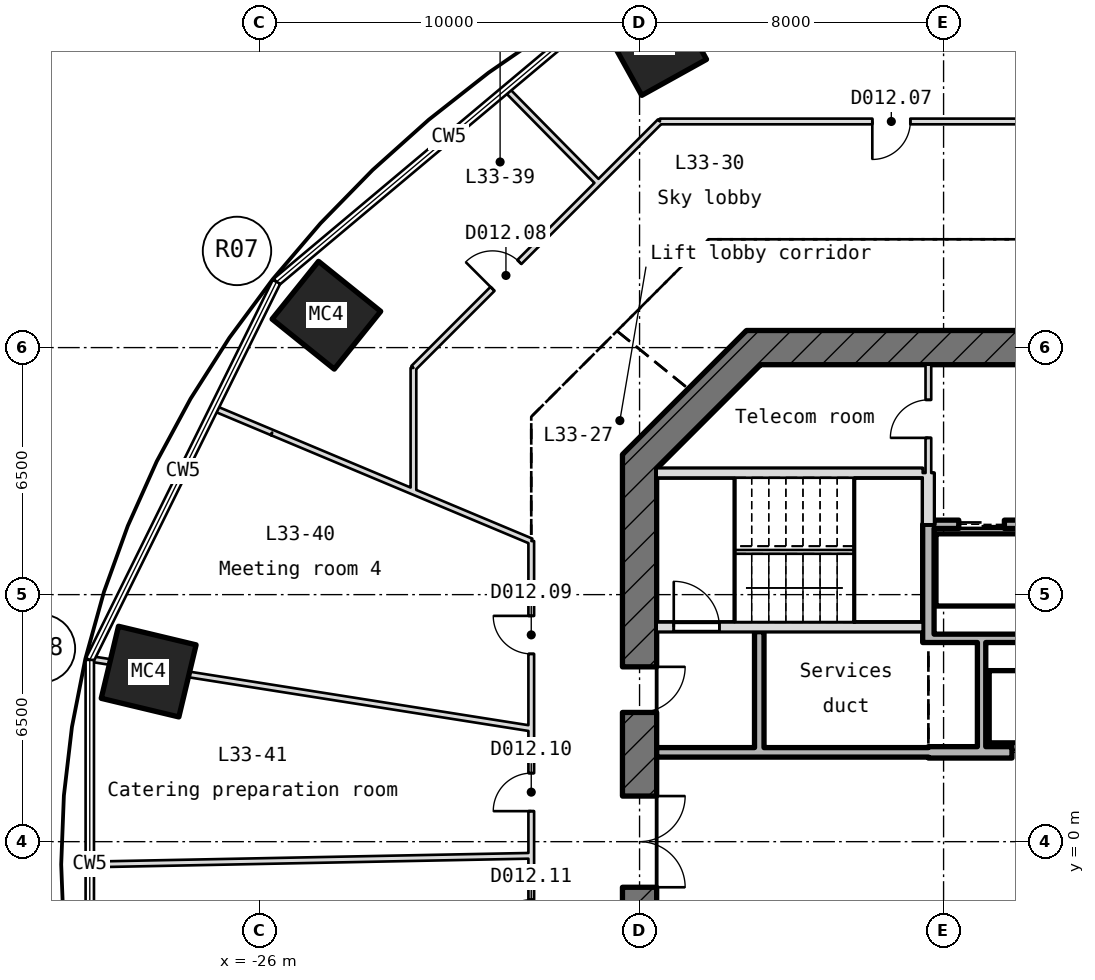
"""IFC4 building model, lengths in metres.
Left out: names, types, materials, properties, quantities, classifications, styles, units other than length and angle.
Written with IfcOpenShell. Run it as: python <this file> out.ifc"""

import sys

from ifc_helpers import new_model, si_unit, direction, frame, frame_2d, origin, origin_2d, place, context, subcontext, project, spatial, rectangle, hollow_rectangle, extrude, element, fill, save


model = new_model("IFC4")
c1 = context("Model", 3, precision=1e-05, world=origin(), true_north=direction((0.0, 1.0)))
c2 = subcontext(c1, "Body", "Model", "MODEL_VIEW")
j1 = project(units=[si_unit("LENGTHUNIT", "METRE"), si_unit("PLANEANGLEUNIT", "RADIAN")], contexts=[c1])
p1 = place(None, origin())
s1 = spatial("IfcSite", under=j1, at=p1, CompositionType="ELEMENT")
p2 = place(p1, origin())
s2 = spatial("IfcBuilding", under=s1, at=p2, CompositionType="ELEMENT")
p3 = place(p2, frame((0.0, 0.0, 155.65)))
s3 = spatial("IfcBuildingStorey", under=s2, at=p3, CompositionType="ELEMENT", Elevation=155.65)
for number, where, z_axis, x_axis in (
    (1, (-15.6, 21.028, -0.25), (0.0, 0.0, 1.0), (0.874, 0.485, 0.0)),
    (2, (-24.241, 13.852, -0.25), (0.0, 0.0, 1.0), (0.627, 0.779, 0.0)),
    (3, (-28.917, 4.475, -0.25), (0.0, 0.0, 1.0), (0.233, 0.972, 0.0)),
):
    element("IfcColumn", number, at=place(p3, frame(where, z_axis=z_axis, x_axis=x_axis)), inside=s3, PredefinedType="COLUMN", context=c2, shape_type="SweptSolid", body=[
        extrude(hollow_rectangle(XDim=1.95, YDim=2.1, WallThickness=0.075, at=origin_2d()), origin(), (0.0, 0.0, 1.0), 5.47),
    ])
p4 = place(p3, frame((13.186, 13.0, -0.25), z_axis=(0.0, 0.0, 1.0), x_axis=(-1.0, 0.0, 0.0)))
e4 = element("IfcWall", 4, at=p4, inside=s3, PredefinedType="SHEAR", context=c2, shape_type="SweptSolid", body=[
    extrude(rectangle(XDim=26.373, YDim=0.9, at=frame_2d((13.186, 0.0))), origin(), (0.0, 0.0, 1.0), 5.47),
])
p5 = place(p4, frame((11.986, 0.0, 0.25)))
e5 = element("IfcOpeningElement", 5, at=p5, cuts=e4, PredefinedType="OPENING", context=c2, shape_type="SweptSolid", body=[
    extrude(rectangle(XDim=2.4, YDim=2.1, at=frame_2d((1.2, 1.05))), frame((0.0, 0.46, 0.0), z_axis=(0.0, -1.0, 0.0), x_axis=(1.0, 0.0, 0.0)), (0.0, 0.0, 1.0), 0.92),
])
p6 = place(p3, frame((-12.868, 13.132, -0.25), z_axis=(0.0, 0.0, 1.0), x_axis=(-0.707106781187, -0.707106781187, 0.0)))
e6 = element("IfcWall", 6, at=p6, inside=s3, PredefinedType="SHEAR", context=c2, shape_type="SweptSolid", body=[
    extrude(rectangle(XDim=4.615, YDim=0.9, at=frame_2d((2.308, 0.0))), origin(), (0.0, 0.0, 1.0), 5.47),
])
p7 = place(p3, frame((-16.0, 10.186, -0.25), z_axis=(0.0, 0.0, 1.0), x_axis=(0.0, -1.0, 0.0)))
e7 = element("IfcWall", 7, at=p7, inside=s3, PredefinedType="SHEAR", context=c2, shape_type="SweptSolid", body=[
    extrude(rectangle(XDim=20.373, YDim=0.9, at=frame_2d((10.186, 0.0))), origin(), (0.0, 0.0, 1.0), 5.47),
])
p8 = place(p7, frame((8.986, 0.0, 0.25)))
e8 = element("IfcOpeningElement", 8, at=p8, cuts=e7, PredefinedType="OPENING", context=c2, shape_type="SweptSolid", body=[
    extrude(rectangle(XDim=2.4, YDim=2.1, at=frame_2d((1.2, 1.05))), frame((0.0, 0.46, 0.0), z_axis=(0.0, -1.0, 0.0), x_axis=(1.0, 0.0, 0.0)), (0.0, 0.0, 1.0), 0.92),
])
p9 = place(p7, frame((5.586, 0.0, 0.25)))
e9 = element("IfcOpeningElement", 9, at=p9, cuts=e7, PredefinedType="OPENING", context=c2, shape_type="SweptSolid", body=[
    extrude(rectangle(XDim=1.2, YDim=2.1, at=frame_2d((0.6, 1.05))), frame((0.0, 0.46, 0.0), z_axis=(0.0, -1.0, 0.0), x_axis=(1.0, 0.0, 0.0)), (0.0, 0.0, 1.0), 0.92),
])
p10 = place(p3, frame((-15.55, 2.35, 0.0), z_axis=(0.0, 0.0, 1.0), x_axis=(1.0, 0.0, 0.0)))
e10 = element("IfcWall", 10, at=p10, inside=s3, PredefinedType="STANDARD", context=c2, shape_type="SweptSolid", body=[
    extrude(rectangle(XDim=7.15, YDim=0.25, at=frame_2d((3.575, 0.0))), origin(), (0.0, 0.0, 1.0), 5.22),
])
p11 = place(p3, frame((-8.4, 2.35, -0.25), z_axis=(0.0, 0.0, 1.0), x_axis=(1.0, 0.0, 0.0)))
e11 = element("IfcWall", 11, at=p11, inside=s3, PredefinedType="SHEAR", context=c2, shape_type="SweptSolid", body=[
    extrude(rectangle(XDim=16.8, YDim=0.3, at=frame_2d((8.4, 0.0))), origin(), (0.0, 0.0, 1.0), 5.47),
])
p12 = place(p11, frame((2.2, 0.0, 0.25)))
e12 = element("IfcOpeningElement", 12, at=p12, cuts=e11, PredefinedType="OPENING", context=c2, shape_type="SweptSolid", body=[
    extrude(rectangle(XDim=1.2, YDim=2.1, at=frame_2d((0.6, 1.05))), frame((0.0, 0.16, 0.0), z_axis=(0.0, -1.0, 0.0), x_axis=(1.0, 0.0, 0.0)), (0.0, 0.0, 1.0), 0.32),
])
p13 = place(p11, frame((5.0, 0.0, 0.25)))
e13 = element("IfcOpeningElement", 13, at=p13, cuts=e11, PredefinedType="OPENING", context=c2, shape_type="SweptSolid", body=[
    extrude(rectangle(XDim=1.2, YDim=2.1, at=frame_2d((0.6, 1.05))), frame((0.0, 0.16, 0.0), z_axis=(0.0, -1.0, 0.0), x_axis=(1.0, 0.0, 0.0)), (0.0, 0.0, 1.0), 0.32),
])
p14 = place(p11, frame((7.8, 0.0, 0.25)))
e14 = element("IfcOpeningElement", 14, at=p14, cuts=e11, PredefinedType="OPENING", context=c2, shape_type="SweptSolid", body=[
    extrude(rectangle(XDim=1.2, YDim=2.1, at=frame_2d((0.6, 1.05))), frame((0.0, 0.16, 0.0), z_axis=(0.0, -1.0, 0.0), x_axis=(1.0, 0.0, 0.0)), (0.0, 0.0, 1.0), 0.32),
])
p15 = place(p11, frame((10.6, 0.0, 0.25)))
e15 = element("IfcOpeningElement", 15, at=p15, cuts=e11, PredefinedType="OPENING", context=c2, shape_type="SweptSolid", body=[
    extrude(rectangle(XDim=1.2, YDim=2.1, at=frame_2d((0.6, 1.05))), frame((0.0, 0.16, 0.0), z_axis=(0.0, -1.0, 0.0), x_axis=(1.0, 0.0, 0.0)), (0.0, 0.0, 1.0), 0.32),
])
p16 = place(p11, frame((13.4, 0.0, 0.25)))
e16 = element("IfcOpeningElement", 16, at=p16, cuts=e11, PredefinedType="OPENING", context=c2, shape_type="SweptSolid", body=[
    extrude(rectangle(XDim=1.2, YDim=2.1, at=frame_2d((0.6, 1.05))), frame((0.0, 0.16, 0.0), z_axis=(0.0, -1.0, 0.0), x_axis=(1.0, 0.0, 0.0)), (0.0, 0.0, 1.0), 0.32),
])
p17 = place(p3, frame((-8.25, 5.35, 0.0), z_axis=(0.0, 0.0, 1.0), x_axis=(1.0, 0.0, 0.0)))
e17 = element("IfcWall", 17, at=p17, inside=s3, PredefinedType="STANDARD", context=c2, shape_type="SweptSolid", body=[
    extrude(rectangle(XDim=16.5, YDim=0.22, at=frame_2d((8.25, 0.0))), origin(), (0.0, 0.0, 1.0), 5.22),
])
p18 = place(p3, frame((-15.55, 5.65, -0.25), z_axis=(0.0, 0.0, 1.0), x_axis=(1.0, 0.0, 0.0)))
e18 = element("IfcWall", 18, at=p18, inside=s3, PredefinedType="SHEAR", context=c2, shape_type="SweptSolid", body=[
    extrude(rectangle(XDim=7.0, YDim=0.25, at=frame_2d((3.5, 0.0))), origin(), (0.0, 0.0, 1.0), 5.47),
])
p19 = place(p18, frame((0.45, 0.0, 0.25)))
e19 = element("IfcOpeningElement", 19, at=p19, cuts=e18, PredefinedType="OPENING", context=c2, shape_type="SweptSolid", body=[
    extrude(rectangle(XDim=1.2, YDim=2.1, at=frame_2d((0.6, 1.05))), frame((0.0, 0.135, 0.0), z_axis=(0.0, -1.0, 0.0), x_axis=(1.0, 0.0, 0.0)), (0.0, 0.0, 1.0), 0.27),
])
p20 = place(p3, frame((-8.25, 8.35, 0.0), z_axis=(0.0, 0.0, 1.0), x_axis=(1.0, 0.0, 0.0)))
e20 = element("IfcWall", 20, at=p20, inside=s3, PredefinedType="STANDARD", context=c2, shape_type="SweptSolid", body=[
    extrude(rectangle(XDim=16.5, YDim=0.22, at=frame_2d((8.25, 0.0))), origin(), (0.0, 0.0, 1.0), 5.22),
])
p21 = place(p20, frame((0.65, 0.0, 0.0)))
e21 = element("IfcOpeningElement", 21, at=p21, cuts=e20, PredefinedType="OPENING", context=c2, shape_type="SweptSolid", body=[
    extrude(rectangle(XDim=1.2, YDim=2.1, at=frame_2d((0.6, 1.05))), frame((0.0, 0.12, 0.0), z_axis=(0.0, -1.0, 0.0), x_axis=(1.0, 0.0, 0.0)), (0.0, 0.0, 1.0), 0.24),
])
p22 = place(p20, frame((3.45, 0.0, 0.0)))
e22 = element("IfcOpeningElement", 22, at=p22, cuts=e20, PredefinedType="OPENING", context=c2, shape_type="SweptSolid", body=[
    extrude(rectangle(XDim=1.2, YDim=2.1, at=frame_2d((0.6, 1.05))), frame((0.0, 0.12, 0.0), z_axis=(0.0, -1.0, 0.0), x_axis=(1.0, 0.0, 0.0)), (0.0, 0.0, 1.0), 0.24),
])
p23 = place(p20, frame((6.25, 0.0, 0.0)))
e23 = element("IfcOpeningElement", 23, at=p23, cuts=e20, PredefinedType="OPENING", context=c2, shape_type="SweptSolid", body=[
    extrude(rectangle(XDim=1.2, YDim=2.1, at=frame_2d((0.6, 1.05))), frame((0.0, 0.12, 0.0), z_axis=(0.0, -1.0, 0.0), x_axis=(1.0, 0.0, 0.0)), (0.0, 0.0, 1.0), 0.24),
])
p24 = place(p20, frame((9.05, 0.0, 0.0)))
e24 = element("IfcOpeningElement", 24, at=p24, cuts=e20, PredefinedType="OPENING", context=c2, shape_type="SweptSolid", body=[
    extrude(rectangle(XDim=1.2, YDim=2.1, at=frame_2d((0.6, 1.05))), frame((0.0, 0.12, 0.0), z_axis=(0.0, -1.0, 0.0), x_axis=(1.0, 0.0, 0.0)), (0.0, 0.0, 1.0), 0.24),
])
p25 = place(p3, frame((-15.55, 9.7, -0.25), z_axis=(0.0, 0.0, 1.0), x_axis=(1.0, 0.0, 0.0)))
e25 = element("IfcWall", 25, at=p25, inside=s3, PredefinedType="SHEAR", context=c2, shape_type="SweptSolid", body=[
    extrude(rectangle(XDim=7.0, YDim=0.25, at=frame_2d((3.5, 0.0))), origin(), (0.0, 0.0, 1.0), 5.47),
])
p26 = place(p3, frame((-12.85, 2.475, 0.0), z_axis=(0.0, 0.0, 1.0), x_axis=(0.0, 1.0, 0.0)))
e26 = element("IfcWall", 26, at=p26, inside=s3, PredefinedType="STANDARD", context=c2, shape_type="SweptSolid", body=[
    extrude(rectangle(XDim=3.05, YDim=0.25, at=frame_2d((1.525, 0.0))), origin(), (0.0, 0.0, 1.0), 5.22),
])
p27 = place(p3, frame((-8.4, 5.24, -0.25), z_axis=(0.0, 0.0, 1.0), x_axis=(0.0, 1.0, 0.0)))
e27 = element("IfcWall", 27, at=p27, inside=s3, PredefinedType="SHEAR", context=c2, shape_type="SweptSolid", body=[
    extrude(rectangle(XDim=3.11, YDim=0.3, at=frame_2d((1.555, 0.0))), origin(), (0.0, 0.0, 1.0), 5.47),
])
p28 = place(p3, frame((-8.4, 8.35, -0.25), z_axis=(0.0, 0.0, 1.0), x_axis=(0.0, 1.0, 0.0)))
e28 = element("IfcWall", 28, at=p28, inside=s3, PredefinedType="SHEAR", context=c2, shape_type="SweptSolid", body=[
    extrude(rectangle(XDim=1.35, YDim=0.3, at=frame_2d((0.675, 0.0))), origin(), (0.0, 0.0, 1.0), 5.47),
])
p29 = place(p3, frame((-8.4, 9.7, 0.0), z_axis=(0.0, 0.0, 1.0), x_axis=(0.0, 1.0, 0.0)))
e29 = element("IfcWall", 29, at=p29, inside=s3, PredefinedType="PARTITIONING", context=c2, shape_type="SweptSolid", body=[
    extrude(rectangle(XDim=2.85, YDim=0.15, at=frame_2d((1.425, 0.0))), origin(), (0.0, 0.0, 1.0), 5.22),
])
p30 = place(p29, frame((0.925, 0.0, 0.0)))
e30 = element("IfcOpeningElement", 30, at=p30, cuts=e29, PredefinedType="OPENING", context=c2, shape_type="SweptSolid", body=[
    extrude(rectangle(XDim=1.0, YDim=2.1, at=frame_2d((0.5, 1.05))), frame((0.0, 0.085, 0.0), z_axis=(0.0, -1.0, 0.0), x_axis=(1.0, 0.0, 0.0)), (0.0, 0.0, 1.0), 0.17),
])
p31 = place(p3, frame((-7.0, 2.5, 0.0), z_axis=(0.0, 0.0, 1.0), x_axis=(0.0, 1.0, 0.0)))
e31 = element("IfcWall", 31, at=p31, inside=s3, PredefinedType="STANDARD", context=c2, shape_type="SweptSolid", body=[
    extrude(rectangle(XDim=2.74, YDim=0.22, at=frame_2d((1.37, 0.0))), origin(), (0.0, 0.0, 1.0), 5.22),
])
p32 = place(p3, frame((-15.465, 18.95, 0.0), z_axis=(0.0, 0.0, 1.0), x_axis=(1.0, 0.0, 0.0)))
e32 = element("IfcWall", 32, at=p32, inside=s3, PredefinedType="PARTITIONING", context=c2, shape_type="SweptSolid", body=[
    extrude(rectangle(XDim=30.929, YDim=0.15, at=frame_2d((15.465, 0.0))), origin(), (0.0, 0.0, 1.0), 5.22),
])
p33 = place(p32, frame((24.356, 0.0, 0.0)))
e33 = element("IfcOpeningElement", 33, at=p33, cuts=e32, PredefinedType="OPENING", context=c2, shape_type="SweptSolid", body=[
    extrude(rectangle(XDim=1.0, YDim=2.1, at=frame_2d((0.5, 1.05))), frame((0.0, 0.085, 0.0), z_axis=(0.0, -1.0, 0.0), x_axis=(1.0, 0.0, 0.0)), (0.0, 0.0, 1.0), 0.17),
])
p34 = place(p32, frame((16.276, 0.0, 0.0)))
e34 = element("IfcOpeningElement", 34, at=p34, cuts=e32, PredefinedType="OPENING", context=c2, shape_type="SweptSolid", body=[
    extrude(rectangle(XDim=1.0, YDim=2.1, at=frame_2d((0.5, 1.05))), frame((0.0, 0.085, 0.0), z_axis=(0.0, -1.0, 0.0), x_axis=(1.0, 0.0, 0.0)), (0.0, 0.0, 1.0), 0.17),
])
p35 = place(p32, frame((5.589, 0.0, 0.0)))
e35 = element("IfcOpeningElement", 35, at=p35, cuts=e32, PredefinedType="OPENING", context=c2, shape_type="SweptSolid", body=[
    extrude(rectangle(XDim=1.0, YDim=2.1, at=frame_2d((0.5, 1.05))), frame((0.0, 0.085, 0.0), z_axis=(0.0, -1.0, 0.0), x_axis=(1.0, 0.0, 0.0)), (0.0, 0.0, 1.0), 0.17),
])
p36 = place(p3, frame((-30.447, -0.6, 0.0), z_axis=(0.0, 0.0, 1.0), x_axis=(0.999805915994, 0.019701023923, 0.0)))
e36 = element("IfcWall", 36, at=p36, inside=s3, PredefinedType="PARTITIONING", context=c2, shape_type="SweptSolid", body=[
    extrude(rectangle(XDim=11.599, YDim=0.15, at=frame_2d((5.8, 0.0))), origin(), (0.0, 0.0, 1.0), 5.22),
])
p37 = place(p3, frame((-21.95, 12.465, 0.0), z_axis=(0.0, 0.0, 1.0), x_axis=(0.707106781187, 0.707106781187, 0.0)))
e37 = element("IfcWall", 37, at=p37, inside=s3, PredefinedType="PARTITIONING", context=c2, shape_type="SweptSolid", body=[
    extrude(rectangle(XDim=9.172, YDim=0.15, at=frame_2d((4.586, 0.0))), origin(), (0.0, 0.0, 1.0), 5.22),
])
p38 = place(p37, frame((2.942, 0.0, 0.0)))
e38 = element("IfcOpeningElement", 38, at=p38, cuts=e37, PredefinedType="OPENING", context=c2, shape_type="SweptSolid", body=[
    extrude(rectangle(XDim=1.0, YDim=2.1, at=frame_2d((0.5, 1.05))), frame((0.0, 0.085, 0.0), z_axis=(0.0, -1.0, 0.0), x_axis=(1.0, 0.0, 0.0)), (0.0, 0.0, 1.0), 0.17),
])
p39 = place(p3, frame((-18.85, -3.688, 0.0), z_axis=(0.0, 0.0, 1.0), x_axis=(0.0, 1.0, 0.0)))
e39 = element("IfcWall", 39, at=p39, inside=s3, PredefinedType="PARTITIONING", context=c2, shape_type="SweptSolid", body=[
    extrude(rectangle(XDim=11.598, YDim=0.15, at=frame_2d((5.799, 0.0))), origin(), (0.0, 0.0, 1.0), 5.22),
])
p40 = place(p39, frame((8.629, 0.0, 0.0)))
e40 = element("IfcOpeningElement", 40, at=p40, cuts=e39, PredefinedType="OPENING", context=c2, shape_type="SweptSolid", body=[
    extrude(rectangle(XDim=1.0, YDim=2.1, at=frame_2d((0.5, 1.05))), frame((0.0, 0.085, 0.0), z_axis=(0.0, -1.0, 0.0), x_axis=(1.0, 0.0, 0.0)), (0.0, 0.0, 1.0), 0.17),
])
p41 = place(p39, frame((4.491, 0.0, 0.0)))
e41 = element("IfcOpeningElement", 41, at=p41, cuts=e39, PredefinedType="OPENING", context=c2, shape_type="SweptSolid", body=[
    extrude(rectangle(XDim=1.0, YDim=2.1, at=frame_2d((0.5, 1.05))), frame((0.0, 0.085, 0.0), z_axis=(0.0, -1.0, 0.0), x_axis=(1.0, 0.0, 0.0)), (0.0, 0.0, 1.0), 0.17),
])
p42 = place(p39, frame((1.161, 0.0, 0.0)))
e42 = element("IfcOpeningElement", 42, at=p42, cuts=e39, PredefinedType="OPENING", context=c2, shape_type="SweptSolid", body=[
    extrude(rectangle(XDim=1.0, YDim=2.1, at=frame_2d((0.5, 1.05))), frame((0.0, 0.085, 0.0), z_axis=(0.0, -1.0, 0.0), x_axis=(1.0, 0.0, 0.0)), (0.0, 0.0, 1.0), 0.17),
])
p43 = place(p3, frame((-21.95, 9.205, 0.0), z_axis=(0.0, 0.0, 1.0), x_axis=(0.0, 1.0, 0.0)))
e43 = element("IfcWall", 43, at=p43, inside=s3, PredefinedType="PARTITIONING", context=c2, shape_type="SweptSolid", body=[
    extrude(rectangle(XDim=3.26, YDim=0.15, at=frame_2d((1.63, 0.0))), origin(), (0.0, 0.0, 1.0), 5.22),
])
p44 = place(p3, frame((-17.082, 17.333, 0.0), z_axis=(0.0, 0.0, 1.0), x_axis=(-0.701943933614, 0.712232205157, 0.0)))
e44 = element("IfcWall", 44, at=p44, inside=s3, PredefinedType="PARTITIONING", context=c2, shape_type="SweptSolid", body=[
    extrude(rectangle(XDim=3.441, YDim=0.15, at=frame_2d((1.72, 0.0))), origin(), (0.0, 0.0, 1.0), 5.22),
])
p45 = place(p3, frame((-18.85, 7.905, 0.0), z_axis=(0.0, 0.0, 1.0), x_axis=(-0.922196281158, 0.386722147049, 0.0)))
e45 = element("IfcWall", 45, at=p45, inside=s3, PredefinedType="PARTITIONING", context=c2, shape_type="SweptSolid", body=[
    extrude(rectangle(XDim=7.394, YDim=0.15, at=frame_2d((3.697, 0.0))), origin(), (0.0, 0.0, 1.0), 4.684),
])
p46 = place(p3, frame((-25.669, 10.764, 0.0), z_axis=(0.0, 0.0, 1.0), x_axis=(-0.922165205367, 0.386796243532, 0.0)))
e46 = element("IfcWall", 46, at=p46, inside=s3, PredefinedType="PARTITIONING", context=c2, shape_type="SweptSolid", body=[
    extrude(rectangle(XDim=1.637, YDim=0.15, at=frame_2d((0.818, 0.0))), origin(), (0.0, 0.0, 1.0), 5.22),
])
p47 = place(p3, frame((-18.85, 2.977, 0.0), z_axis=(0.0, 0.0, 1.0), x_axis=(-0.987756177072, 0.156005559696, 0.0)))
e47 = element("IfcWall", 47, at=p47, inside=s3, PredefinedType="PARTITIONING", context=c2, shape_type="SweptSolid", body=[
    extrude(rectangle(XDim=9.625, YDim=0.15, at=frame_2d((4.812, 0.0))), origin(), (0.0, 0.0, 1.0), 4.608),
])
p48 = place(p3, frame((-28.357, 4.479, 0.0), z_axis=(0.0, 0.0, 1.0), x_axis=(-0.987758256006, 0.155992396262, 0.0)))
e48 = element("IfcWall", 48, at=p48, inside=s3, PredefinedType="PARTITIONING", context=c2, shape_type="SweptSolid", body=[
    extrude(rectangle(XDim=2.102, YDim=0.15, at=frame_2d((1.051, 0.0))), origin(), (0.0, 0.0, 1.0), 5.22),
])
p49 = place(p12, origin())
e49 = element("IfcDoor", 49, at=p49, inside=s3, OperationType="DOUBLE_DOOR_SLIDING", PredefinedType="DOOR", context=c2, shape_type="SweptSolid", body=[
    extrude(rectangle(XDim=1.2, YDim=2.1, at=frame_2d((0.6, 1.05))), frame((0.0, 0.025, 0.0), z_axis=(0.0, -1.0, 0.0), x_axis=(1.0, 0.0, 0.0)), (0.0, 0.0, 1.0), 0.05),
])
fill(e12, e49)
p50 = place(p21, origin())
e50 = element("IfcDoor", 50, at=p50, inside=s3, OperationType="DOUBLE_DOOR_SLIDING", PredefinedType="DOOR", context=c2, shape_type="SweptSolid", body=[
    extrude(rectangle(XDim=1.2, YDim=2.1, at=frame_2d((0.6, 1.05))), frame((0.0, 0.025, 0.0), z_axis=(0.0, -1.0, 0.0), x_axis=(1.0, 0.0, 0.0)), (0.0, 0.0, 1.0), 0.05),
])
fill(e21, e50)
p51 = place(p19, origin())
e51 = element("IfcDoor", 51, at=p51, inside=s3, OperationType="SINGLE_SWING_RIGHT", PredefinedType="DOOR", context=c2, shape_type="SweptSolid", body=[
    extrude(rectangle(XDim=1.2, YDim=2.1, at=frame_2d((0.6, 1.05))), frame((0.0, 0.025, 0.0), z_axis=(0.0, -1.0, 0.0), x_axis=(1.0, 0.0, 0.0)), (0.0, 0.0, 1.0), 0.05),
])
fill(e19, e51)
p52 = place(p8, origin())
e52 = element("IfcDoor", 52, at=p52, inside=s3, OperationType="DOUBLE_DOOR_SINGLE_SWING", PredefinedType="DOOR", context=c2, shape_type="SweptSolid", body=[
    extrude(rectangle(XDim=2.4, YDim=2.1, at=frame_2d((1.2, 1.05))), frame((0.0, 0.025, 0.0), z_axis=(0.0, -1.0, 0.0), x_axis=(1.0, 0.0, 0.0)), (0.0, 0.0, 1.0), 0.05),
])
fill(e8, e52)
p53 = place(p9, origin())
e53 = element("IfcDoor", 53, at=p53, inside=s3, OperationType="SINGLE_SWING_RIGHT", PredefinedType="DOOR", context=c2, shape_type="SweptSolid", body=[
    extrude(rectangle(XDim=1.2, YDim=2.1, at=frame_2d((0.6, 1.05))), frame((0.0, 0.025, 0.0), z_axis=(0.0, -1.0, 0.0), x_axis=(1.0, 0.0, 0.0)), (0.0, 0.0, 1.0), 0.05),
])
fill(e9, e53)
p54 = place(p30, origin())
e54 = element("IfcDoor", 54, at=p54, inside=s3, OperationType="SINGLE_SWING_RIGHT", PredefinedType="DOOR", context=c2, shape_type="SweptSolid", body=[
    extrude(rectangle(XDim=1.0, YDim=2.1, at=frame_2d((0.5, 1.05))), frame((0.0, 0.025, 0.0), z_axis=(0.0, -1.0, 0.0), x_axis=(1.0, 0.0, 0.0)), (0.0, 0.0, 1.0), 0.05),
])
fill(e30, e54)
p55 = place(p35, frame((1.0, 0.0, 0.0), z_axis=(0.0, 0.0, 1.0), x_axis=(-1.0, 0.0, 0.0)))
e55 = element("IfcDoor", 55, at=p55, inside=s3, OperationType="SINGLE_SWING_LEFT", PredefinedType="DOOR", context=c2, shape_type="SweptSolid", body=[
    extrude(rectangle(XDim=1.0, YDim=2.1, at=frame_2d((0.5, 1.05))), frame((0.0, 0.025, 0.0), z_axis=(0.0, -1.0, 0.0), x_axis=(1.0, 0.0, 0.0)), (0.0, 0.0, 1.0), 0.05),
])
fill(e35, e55)
p56 = place(p38, origin())
e56 = element("IfcDoor", 56, at=p56, inside=s3, OperationType="SINGLE_SWING_RIGHT", PredefinedType="DOOR", context=c2, shape_type="SweptSolid", body=[
    extrude(rectangle(XDim=1.0, YDim=2.1, at=frame_2d((0.5, 1.05))), frame((0.0, 0.025, 0.0), z_axis=(0.0, -1.0, 0.0), x_axis=(1.0, 0.0, 0.0)), (0.0, 0.0, 1.0), 0.05),
])
fill(e38, e56)
p57 = place(p40, origin())
e57 = element("IfcDoor", 57, at=p57, inside=s3, OperationType="SINGLE_SWING_RIGHT", PredefinedType="DOOR", context=c2, shape_type="SweptSolid", body=[
    extrude(rectangle(XDim=1.0, YDim=2.1, at=frame_2d((0.5, 1.05))), frame((0.0, 0.025, 0.0), z_axis=(0.0, -1.0, 0.0), x_axis=(1.0, 0.0, 0.0)), (0.0, 0.0, 1.0), 0.05),
])
fill(e40, e57)
p58 = place(p41, origin())
e58 = element("IfcDoor", 58, at=p58, inside=s3, OperationType="SINGLE_SWING_RIGHT", PredefinedType="DOOR", context=c2, shape_type="SweptSolid", body=[
    extrude(rectangle(XDim=1.0, YDim=2.1, at=frame_2d((0.5, 1.05))), frame((0.0, 0.025, 0.0), z_axis=(0.0, -1.0, 0.0), x_axis=(1.0, 0.0, 0.0)), (0.0, 0.0, 1.0), 0.05),
])
fill(e41, e58)
save(model, sys.argv[1])
